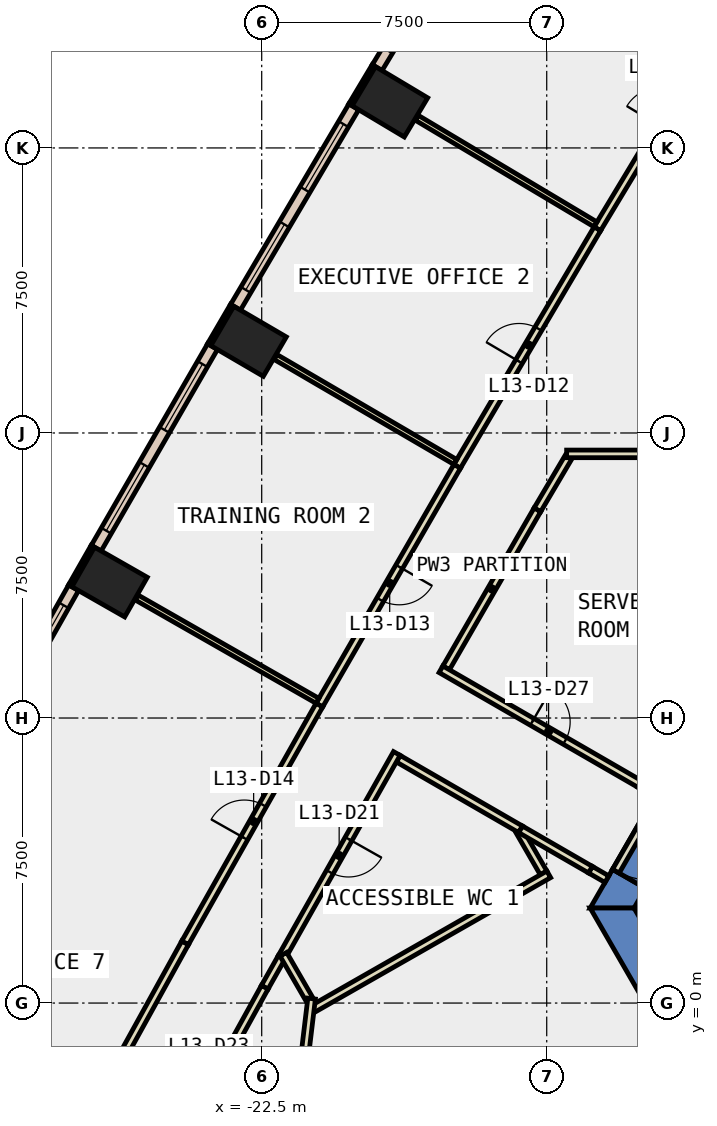
"""IFC4 building model, lengths in metres.
Left out: names, types, materials, properties, quantities, classifications, styles, units other than length and angle.
Written with IfcOpenShell. Run it as: python <this file> out.ifc"""

import sys

from ifc_helpers import new_model, si_unit, direction, frame, frame_2d, origin, origin_2d, place, context, subcontext, project, spatial, polyline, rectangle, outline, extrude, element, fill, save


model = new_model("IFC4")
c1 = context("Model", 3, precision=1e-05, world=origin(), true_north=direction((0.0, 1.0)))
c2 = subcontext(c1, "Body", "Model", "MODEL_VIEW")
j1 = project(units=[si_unit("LENGTHUNIT", "METRE"), si_unit("PLANEANGLEUNIT", "RADIAN")], contexts=[c1])
p1 = place(None, origin())
s1 = spatial("IfcSite", under=j1, at=p1, CompositionType="ELEMENT")
p2 = place(p1, origin())
s2 = spatial("IfcBuilding", under=s1, at=p2, CompositionType="ELEMENT")
p3 = place(p2, frame((0.0, 0.0, 64.4)))
s3 = spatial("IfcBuildingStorey", under=s2, at=p3, CompositionType="ELEMENT", Elevation=64.4)
for number, where, z_axis, x_axis in (
    (1, (-19.127, 23.714, -0.4), (0.0, 0.0, 1.0), (0.513, 0.858, 0.0)),
    (2, (-22.846, 17.413, -0.4), (0.0, 0.0, 1.0), (0.504, 0.864, 0.0)),
    (3, (-26.503, 11.078, -0.4), (0.0, 0.0, 1.0), (0.496, 0.869, 0.0)),
):
    element("IfcColumn", number, at=place(p3, frame(where, z_axis=z_axis, x_axis=x_axis)), inside=s3, PredefinedType="COLUMN", context=c2, shape_type="SweptSolid", body=[
        extrude(rectangle(XDim=1.2, YDim=1.6, at=origin_2d()), origin(), (0.0, 0.0, 1.0), 4.2),
    ])
p4 = place(p3, frame((0.0, 0.0, -0.4)))
e4 = element("IfcWall", 4, at=p4, inside=s3, PredefinedType="SHEAR", context=c2, shape_type="SweptSolid", body=[
    extrude(outline(polyline([(-12.402, 3.02), (-13.267, 3.52), (-13.856, 2.5), (-12.702, 2.5), (-12.402, 3.02)])), origin(), (0.0, 0.0, 1.0), 4.2),
])
p5 = place(p3, frame((0.0, 0.0, 3.6)))
e5 = element("IfcWall", 5, at=p5, inside=s3, PredefinedType="SHEAR", context=c2, shape_type="SweptSolid", body=[
    extrude(outline(polyline([(-13.267, 3.52), (-12.402, 3.02), (-11.402, 4.752), (-12.267, 5.252), (-13.267, 3.52)])), origin(), (0.0, 0.0, 1.0), 0.2),
])
p6 = place(p3, frame((0.0, 0.0, -0.4)))
e6 = element("IfcWall", 6, at=p6, inside=s3, PredefinedType="SHEAR", context=c2, shape_type="SweptSolid", body=[
    extrude(outline(polyline([(-13.856, 2.5), (-6.928, -9.5), (-6.351, -8.5), (-12.702, 2.5), (-13.856, 2.5)])), origin(), (0.0, 0.0, 1.0), 4.2),
])
p7 = place(p3, frame((-19.549, 24.665, 0.0), z_axis=(0.0, 0.0, 1.0), x_axis=(-0.513238760752, -0.858245870635, 0.0)))
e7 = element("IfcWall", 7, at=p7, inside=s3, PredefinedType="STANDARD", context=c2, shape_type="SweptSolid", body=[
    extrude(rectangle(XDim=1.2, YDim=0.1, at=frame_2d((0.6, 0.0))), origin(), (0.0, 0.0, 1.0), 3.8),
])
p8 = place(p3, frame((-23.277, 18.36, 0.0), z_axis=(0.0, 0.0, 1.0), x_axis=(-0.504225229382, -0.863572184623, 0.0)))
e8 = element("IfcWall", 8, at=p8, inside=s3, PredefinedType="STANDARD", context=c2, shape_type="SweptSolid", body=[
    extrude(rectangle(XDim=1.2, YDim=0.1, at=frame_2d((0.6, 0.0))), origin(), (0.0, 0.0, 1.0), 3.8),
])
p9 = place(p3, frame((-26.944, 12.02, 0.0), z_axis=(0.0, 0.0, 1.0), x_axis=(-0.495854054996, -0.868405870629, 0.0)))
e9 = element("IfcWall", 9, at=p9, inside=s3, PredefinedType="STANDARD", context=c2, shape_type="SweptSolid", body=[
    extrude(rectangle(XDim=1.2, YDim=0.1, at=frame_2d((0.6, 0.0))), origin(), (0.0, 0.0, 1.0), 3.8),
])
p10 = place(p3, frame((-16.3, 29.859, 0.0), z_axis=(0.0, 0.0, 1.0), x_axis=(-0.516147563478, -0.856499674674, 0.0)))
e10 = element("IfcWall", 10, at=p10, inside=s3, PredefinedType="STANDARD", context=c2, shape_type="SweptSolid", body=[
    extrude(rectangle(XDim=6.126, YDim=0.3, at=frame_2d((3.063, 0.0))), origin(), (0.0, 0.0, 1.0), 3.8),
])
p11 = place(p10, frame((0.532, 0.0, 0.9)))
e11 = element("IfcOpeningElement", 11, at=p11, cuts=e10, PredefinedType="OPENING", context=c2, shape_type="SweptSolid", body=[
    extrude(rectangle(XDim=2.0, YDim=2.6, at=frame_2d((1.0, 1.3))), frame((0.0, 0.16, 0.0), z_axis=(0.0, -1.0, 0.0), x_axis=(1.0, 0.0, 0.0)), (0.0, 0.0, 1.0), 0.32),
])
p12 = place(p10, frame((3.595, 0.0, 0.9)))
e12 = element("IfcOpeningElement", 12, at=p12, cuts=e10, PredefinedType="OPENING", context=c2, shape_type="SweptSolid", body=[
    extrude(rectangle(XDim=2.0, YDim=2.6, at=frame_2d((1.0, 1.3))), frame((0.0, 0.16, 0.0), z_axis=(0.0, -1.0, 0.0), x_axis=(1.0, 0.0, 0.0)), (0.0, 0.0, 1.0), 0.32),
])
p13 = place(p3, frame((-20.076, 23.583, 0.0), z_axis=(0.0, 0.0, 1.0), x_axis=(-0.508163938648, -0.861260362177, 0.0)))
e13 = element("IfcWall", 13, at=p13, inside=s3, PredefinedType="STANDARD", context=c2, shape_type="SweptSolid", body=[
    extrude(rectangle(XDim=6.126, YDim=0.3, at=frame_2d((3.063, 0.0))), origin(), (0.0, 0.0, 1.0), 3.8),
])
p14 = place(p13, frame((0.531, 0.0, 0.9)))
e14 = element("IfcOpeningElement", 14, at=p14, cuts=e13, PredefinedType="OPENING", context=c2, shape_type="SweptSolid", body=[
    extrude(rectangle(XDim=2.0, YDim=2.6, at=frame_2d((1.0, 1.3))), frame((0.0, 0.16, 0.0), z_axis=(0.0, -1.0, 0.0), x_axis=(1.0, 0.0, 0.0)), (0.0, 0.0, 1.0), 0.32),
])
p15 = place(p13, frame((3.594, 0.0, 0.9)))
e15 = element("IfcOpeningElement", 15, at=p15, cuts=e13, PredefinedType="OPENING", context=c2, shape_type="SweptSolid", body=[
    extrude(rectangle(XDim=2.0, YDim=2.6, at=frame_2d((1.0, 1.3))), frame((0.0, 0.16, 0.0), z_axis=(0.0, -1.0, 0.0), x_axis=(1.0, 0.0, 0.0)), (0.0, 0.0, 1.0), 0.32),
])
p16 = place(p3, frame((-23.793, 17.273, 0.0), z_axis=(0.0, 0.0, 1.0), x_axis=(-0.499903021601, -0.86608138705, 0.0)))
e16 = element("IfcWall", 16, at=p16, inside=s3, PredefinedType="STANDARD", context=c2, shape_type="SweptSolid", body=[
    extrude(rectangle(XDim=6.125, YDim=0.3, at=frame_2d((3.062, 0.0))), origin(), (0.0, 0.0, 1.0), 3.8),
])
p17 = place(p16, frame((0.531, 0.0, 0.9)))
e17 = element("IfcOpeningElement", 17, at=p17, cuts=e16, PredefinedType="OPENING", context=c2, shape_type="SweptSolid", body=[
    extrude(rectangle(XDim=2.0, YDim=2.6, at=frame_2d((1.0, 1.3))), frame((0.0, 0.16, 0.0), z_axis=(0.0, -1.0, 0.0), x_axis=(1.0, 0.0, 0.0)), (0.0, 0.0, 1.0), 0.32),
])
p18 = place(p16, frame((3.594, 0.0, 0.9)))
e18 = element("IfcOpeningElement", 18, at=p18, cuts=e16, PredefinedType="OPENING", context=c2, shape_type="SweptSolid", body=[
    extrude(rectangle(XDim=2.0, YDim=2.6, at=frame_2d((1.0, 1.3))), frame((0.0, 0.16, 0.0), z_axis=(0.0, -1.0, 0.0), x_axis=(1.0, 0.0, 0.0)), (0.0, 0.0, 1.0), 0.32),
])
p19 = place(p3, frame((-27.449, 10.928, 0.0), z_axis=(0.0, 0.0, 1.0), x_axis=(-0.491887822214, -0.870658584267, 0.0)))
e19 = element("IfcWall", 19, at=p19, inside=s3, PredefinedType="STANDARD", context=c2, shape_type="SweptSolid", body=[
    extrude(rectangle(XDim=6.125, YDim=0.3, at=frame_2d((3.062, 0.0))), origin(), (0.0, 0.0, 1.0), 3.8),
])
p20 = place(p19, frame((0.531, 0.0, 0.9)))
e20 = element("IfcOpeningElement", 20, at=p20, cuts=e19, PredefinedType="OPENING", context=c2, shape_type="SweptSolid", body=[
    extrude(rectangle(XDim=2.0, YDim=2.6, at=frame_2d((1.0, 1.3))), frame((0.0, 0.16, 0.0), z_axis=(0.0, -1.0, 0.0), x_axis=(1.0, 0.0, 0.0)), (0.0, 0.0, 1.0), 0.32),
])
p21 = place(p19, frame((3.594, 0.0, 0.9)))
e21 = element("IfcOpeningElement", 21, at=p21, cuts=e19, PredefinedType="OPENING", context=c2, shape_type="SweptSolid", body=[
    extrude(rectangle(XDim=2.0, YDim=2.6, at=frame_2d((1.0, 1.3))), frame((0.0, 0.16, 0.0), z_axis=(0.0, -1.0, 0.0), x_axis=(1.0, 0.0, 0.0)), (0.0, 0.0, 1.0), 0.32),
])
p22 = place(p3, frame((-14.427, 14.364, 0.0), z_axis=(0.0, 0.0, 1.0), x_axis=(-0.508509719672, -0.861056249614, 0.0)))
e22 = element("IfcWall", 22, at=p22, inside=s3, PredefinedType="PARTITIONING", context=c2, shape_type="SweptSolid", body=[
    extrude(rectangle(XDim=1.611, YDim=0.2, at=frame_2d((0.805, 0.0))), origin(), (0.0, 0.0, 1.0), 3.8),
])
p23 = place(p3, frame((-15.246, 12.977, 0.0), z_axis=(0.0, 0.0, 1.0), x_axis=(-0.499891203561, -0.866088208327, 0.0)))
e23 = element("IfcWall", 23, at=p23, inside=s3, PredefinedType="PARTITIONING", context=c2, shape_type="SweptSolid", body=[
    extrude(rectangle(XDim=4.801, YDim=0.2, at=frame_2d((2.4, 0.0))), origin(), (0.0, 0.0, 1.0), 3.8),
])
p24 = place(p3, frame((-17.783, 8.783, 0.0), z_axis=(0.0, 0.0, 1.0), x_axis=(0.866041598752, -0.499971948444, 0.0)))
e24 = element("IfcWall", 24, at=p24, inside=s3, PredefinedType="PARTITIONING", context=c2, shape_type="SweptSolid", body=[
    extrude(rectangle(XDim=6.042, YDim=0.2, at=frame_2d((3.021, 0.0))), origin(), (0.0, 0.0, 1.0), 3.8),
])
p25 = place(p24, frame((2.771, 0.0, 0.0)))
e25 = element("IfcOpeningElement", 25, at=p25, cuts=e24, PredefinedType="OPENING", context=c2, shape_type="SweptSolid", body=[
    extrude(rectangle(XDim=1.0, YDim=2.1, at=frame_2d((0.5, 1.05))), frame((0.0, 0.11, 0.0), z_axis=(0.0, -1.0, 0.0), x_axis=(1.0, 0.0, 0.0)), (0.0, 0.0, 1.0), 0.22),
])
p26 = place(p3, frame((-15.687, 4.571, 0.0), z_axis=(0.0, 0.0, 1.0), x_axis=(-0.866044530317, 0.49996687041, 0.0)))
e26 = element("IfcWall", 26, at=p26, inside=s3, PredefinedType="PARTITIONING", context=c2, shape_type="SweptSolid", body=[
    extrude(rectangle(XDim=3.718, YDim=0.2, at=frame_2d((1.859, 0.0))), origin(), (0.0, 0.0, 1.0), 3.8),
])
p27 = place(p3, frame((-18.945, 6.567, 0.0), z_axis=(0.0, 0.0, 1.0), x_axis=(-0.491840751019, -0.87068517596, 0.0)))
e27 = element("IfcWall", 27, at=p27, inside=s3, PredefinedType="PARTITIONING", context=c2, shape_type="SweptSolid", body=[
    extrude(rectangle(XDim=6.168, YDim=0.2, at=frame_2d((3.084, 0.0))), origin(), (0.0, 0.0, 1.0), 3.8),
])
p28 = place(p27, frame((2.584, 0.0, 0.0)))
e28 = element("IfcOpeningElement", 28, at=p28, cuts=e27, PredefinedType="OPENING", context=c2, shape_type="SweptSolid", body=[
    extrude(rectangle(XDim=1.0, YDim=2.1, at=frame_2d((0.5, 1.05))), frame((0.0, 0.11, 0.0), z_axis=(0.0, -1.0, 0.0), x_axis=(1.0, 0.0, 0.0)), (0.0, 0.0, 1.0), 0.22),
])
p29 = place(p3, frame((-13.417, 3.26, 0.0), z_axis=(0.0, 0.0, 1.0), x_axis=(-0.866071776036, 0.499919672301, 0.0)))
e29 = element("IfcWall", 29, at=p29, inside=s3, PredefinedType="PARTITIONING", context=c2, shape_type="SweptSolid", body=[
    extrude(rectangle(XDim=0.5, YDim=0.2, at=frame_2d((0.25, 0.0))), origin(), (0.0, 0.0, 1.0), 2.4),
])
p30 = place(p3, frame((-21.979, 1.196, 0.0), z_axis=(0.0, 0.0, 1.0), x_axis=(-0.491617674369, -0.870811151886, 0.0)))
e30 = element("IfcWall", 30, at=p30, inside=s3, PredefinedType="PARTITIONING", context=c2, shape_type="SweptSolid", body=[
    extrude(rectangle(XDim=0.897, YDim=0.2, at=frame_2d((0.448, 0.0))), origin(), (0.0, 0.0, 1.0), 3.8),
])
p31 = place(p3, frame((-22.42, 0.415, 0.0), z_axis=(0.0, 0.0, 1.0), x_axis=(-0.483559496818, -0.875311494861, 0.0)))
e31 = element("IfcWall", 31, at=p31, inside=s3, PredefinedType="PARTITIONING", context=c2, shape_type="SweptSolid", body=[
    extrude(rectangle(XDim=6.103, YDim=0.2, at=frame_2d((3.052, 0.0))), origin(), (0.0, 0.0, 1.0), 3.8),
])
p32 = place(p31, frame((2.552, 0.0, 0.0)))
e32 = element("IfcOpeningElement", 32, at=p32, cuts=e31, PredefinedType="OPENING", context=c2, shape_type="SweptSolid", body=[
    extrude(rectangle(XDim=1.0, YDim=2.1, at=frame_2d((0.5, 1.05))), frame((0.0, 0.11, 0.0), z_axis=(0.0, -1.0, 0.0), x_axis=(1.0, 0.0, 0.0)), (0.0, 0.0, 1.0), 0.22),
])
p33 = place(p3, frame((-13.669, 20.373, 0.0), z_axis=(0.0, 0.0, 1.0), x_axis=(0.516247820136, 0.85643924957, 0.0)))
e33 = element("IfcWall", 33, at=p33, inside=s3, PredefinedType="PARTITIONING", context=c2, shape_type="SweptSolid", body=[
    extrude(rectangle(XDim=7.332, YDim=0.2, at=frame_2d((3.666, 0.0))), origin(), (0.0, 0.0, 1.0), 3.8),
])
p34 = place(p33, frame((3.166, 0.0, 0.0)))
e34 = element("IfcOpeningElement", 34, at=p34, cuts=e33, PredefinedType="OPENING", context=c2, shape_type="SweptSolid", body=[
    extrude(rectangle(XDim=1.0, YDim=2.1, at=frame_2d((0.5, 1.05))), frame((0.0, 0.11, 0.0), z_axis=(0.0, -1.0, 0.0), x_axis=(1.0, 0.0, 0.0)), (0.0, 0.0, 1.0), 0.22),
])
p35 = place(p3, frame((-17.357, 14.122, 0.0), z_axis=(0.0, 0.0, 1.0), x_axis=(0.508298575594, 0.861180909014, 0.0)))
e35 = element("IfcWall", 35, at=p35, inside=s3, PredefinedType="PARTITIONING", context=c2, shape_type="SweptSolid", body=[
    extrude(rectangle(XDim=7.258, YDim=0.2, at=frame_2d((3.629, 0.0))), origin(), (0.0, 0.0, 1.0), 3.8),
])
p36 = place(p35, frame((3.204, 0.0, 0.0)))
e36 = element("IfcOpeningElement", 36, at=p36, cuts=e35, PredefinedType="OPENING", context=c2, shape_type="SweptSolid", body=[
    extrude(rectangle(XDim=1.0, YDim=2.1, at=frame_2d((0.5, 1.05))), frame((0.0, 0.11, 0.0), z_axis=(0.0, -1.0, 0.0), x_axis=(1.0, 0.0, 0.0)), (0.0, 0.0, 1.0), 0.22),
])
p37 = place(p3, frame((-17.356, 14.122, 0.0), z_axis=(0.0, 0.0, 1.0), x_axis=(-0.499946764175, -0.866056137321, 0.0)))
e37 = element("IfcWall", 37, at=p37, inside=s3, PredefinedType="PARTITIONING", context=c2, shape_type="SweptSolid", body=[
    extrude(rectangle(XDim=7.255, YDim=0.2, at=frame_2d((3.627, 0.0))), origin(), (0.0, 0.0, 1.0), 3.8),
])
p38 = place(p37, frame((3.052, 0.0, 0.0)))
e38 = element("IfcOpeningElement", 38, at=p38, cuts=e37, PredefinedType="OPENING", context=c2, shape_type="SweptSolid", body=[
    extrude(rectangle(XDim=1.0, YDim=2.1, at=frame_2d((0.5, 1.05))), frame((0.0, 0.11, 0.0), z_axis=(0.0, -1.0, 0.0), x_axis=(1.0, 0.0, 0.0)), (0.0, 0.0, 1.0), 0.22),
])
p39 = place(p3, frame((-28.06, -4.831, 0.0), z_axis=(0.0, 0.0, 1.0), x_axis=(0.483631054848, 0.875271959328, 0.0)))
e39 = element("IfcWall", 39, at=p39, inside=s3, PredefinedType="PARTITIONING", context=c2, shape_type="SweptSolid", body=[
    extrude(rectangle(XDim=7.33, YDim=0.2, at=frame_2d((3.665, 0.0))), origin(), (0.0, 0.0, 1.0), 3.8),
])
p40 = place(p3, frame((-24.515, 1.585, 0.0), z_axis=(0.0, 0.0, 1.0), x_axis=(0.49174361417, 0.870740040381, 0.0)))
e40 = element("IfcWall", 40, at=p40, inside=s3, PredefinedType="PARTITIONING", context=c2, shape_type="SweptSolid", body=[
    extrude(rectangle(XDim=7.183, YDim=0.2, at=frame_2d((3.591, 0.0))), origin(), (0.0, 0.0, 1.0), 3.8),
])
p41 = place(p40, frame((3.166, 0.0, 0.0)))
e41 = element("IfcOpeningElement", 41, at=p41, cuts=e40, PredefinedType="OPENING", context=c2, shape_type="SweptSolid", body=[
    extrude(rectangle(XDim=1.0, YDim=2.1, at=frame_2d((0.5, 1.05))), frame((0.0, 0.11, 0.0), z_axis=(0.0, -1.0, 0.0), x_axis=(1.0, 0.0, 0.0)), (0.0, 0.0, 1.0), 0.22),
])
p42 = place(p3, frame((-6.957, 14.45, 0.0), z_axis=(0.0, 0.0, 1.0), x_axis=(-1.0, 0.0, 0.0)))
e42 = element("IfcWall", 42, at=p42, inside=s3, PredefinedType="PARTITIONING", context=c2, shape_type="SweptSolid", body=[
    extrude(rectangle(XDim=7.519, YDim=0.2, at=frame_2d((3.76, 0.0))), origin(), (0.0, 0.0, 1.0), 3.8),
])
p43 = place(p3, frame((-15.724, 4.534, 0.0), z_axis=(0.0, 0.0, 1.0), x_axis=(0.500195085719, -0.865912741691, 0.0)))
e43 = element("IfcWall", 43, at=p43, inside=s3, PredefinedType="PARTITIONING", context=c2, shape_type="SweptSolid", body=[
    extrude(rectangle(XDim=1.282, YDim=0.2, at=frame_2d((0.641, 0.0))), origin(), (0.0, 0.0, 1.0), 3.8),
])
p44 = place(p3, frame((-14.946, 3.387, 0.0), z_axis=(0.0, 0.0, 1.0), x_axis=(-0.868556003823, -0.4955910292, 0.0)))
e44 = element("IfcWall", 44, at=p44, inside=s3, PredefinedType="PARTITIONING", context=c2, shape_type="SweptSolid", body=[
    extrude(rectangle(XDim=7.199, YDim=0.2, at=frame_2d((3.6, 0.0))), origin(), (0.0, 0.0, 1.0), 3.8),
])
p45 = place(p3, frame((-21.249, 0.105, 0.0), z_axis=(0.0, 0.0, 1.0), x_axis=(-0.500442009317, 0.865770059144, 0.0)))
e45 = element("IfcWall", 45, at=p45, inside=s3, PredefinedType="PARTITIONING", context=c2, shape_type="SweptSolid", body=[
    extrude(rectangle(XDim=1.361, YDim=0.2, at=frame_2d((0.68, 0.0))), origin(), (0.0, 0.0, 1.0), 3.8),
])
p46 = place(p3, frame((-22.403, -10.017, 0.0), z_axis=(0.0, 0.0, 1.0), x_axis=(0.119143334217, 0.992877064853, 0.0)))
e46 = element("IfcWall", 46, at=p46, inside=s3, PredefinedType="PARTITIONING", context=c2, shape_type="SweptSolid", body=[
    extrude(rectangle(XDim=10.207, YDim=0.2, at=frame_2d((5.104, 0.0))), origin(), (0.0, 0.0, 1.0), 3.8),
])
p47 = place(p3, frame((-13.716, 20.488, 0.0), z_axis=(0.0, 0.0, 1.0), x_axis=(-0.85883841868, 0.512246591594, 0.0)))
e47 = element("IfcWall", 47, at=p47, inside=s3, PredefinedType="PARTITIONING", context=c2, shape_type="SweptSolid", body=[
    extrude(rectangle(XDim=5.479, YDim=0.15, at=frame_2d((2.74, 0.0))), origin(), (0.0, 0.0, 1.0), 3.8),
])
p48 = place(p3, frame((-17.405, 14.237, 0.0), z_axis=(0.0, 0.0, 1.0), x_axis=(-0.863614048932, 0.504153522736, 0.0)))
e48 = element("IfcWall", 48, at=p48, inside=s3, PredefinedType="PARTITIONING", context=c2, shape_type="SweptSolid", body=[
    extrude(rectangle(XDim=5.48, YDim=0.15, at=frame_2d((2.74, 0.0))), origin(), (0.0, 0.0, 1.0), 3.8),
])
p49 = place(p3, frame((-21.033, 7.953, 0.0), z_axis=(0.0, 0.0, 1.0), x_axis=(-0.868311678357, 0.496018980715, 0.0)))
e49 = element("IfcWall", 49, at=p49, inside=s3, PredefinedType="PARTITIONING", context=c2, shape_type="SweptSolid", body=[
    extrude(rectangle(XDim=5.48, YDim=0.15, at=frame_2d((2.74, 0.0))), origin(), (0.0, 0.0, 1.0), 3.8),
])
p50 = place(p3, frame((-12.18, 5.202, 0.0), z_axis=(0.0, 0.0, 1.0), x_axis=(-0.50002537861, -0.866010750942, 0.0)))
e50 = element("IfcWall", 50, at=p50, inside=s3, PredefinedType="PARTITIONING", context=c2, shape_type="SweptSolid", body=[
    extrude(rectangle(XDim=2.0, YDim=0.2, at=frame_2d((1.0, 0.0))), origin(), (0.0, 0.0, 1.0), 2.4),
])
p51 = place(p50, frame((0.19, 0.0, 0.0)))
e51 = element("IfcOpeningElement", 51, at=p51, cuts=e50, PredefinedType="OPENING", context=c2, shape_type="SweptSolid", body=[
    extrude(rectangle(XDim=1.8, YDim=2.1, at=frame_2d((0.9, 1.05))), frame((0.0, 0.11, 0.0), z_axis=(0.0, -1.0, 0.0), x_axis=(1.0, 0.0, 0.0)), (0.0, 0.0, 1.0), 0.22),
])
p52 = place(p3, frame((-13.85, 3.51, 0.0), z_axis=(0.0, 0.0, 1.0), x_axis=(-0.865924890849, 0.500174053114, 0.0)))
e52 = element("IfcWall", 52, at=p52, inside=s3, PredefinedType="PARTITIONING", context=c2, shape_type="SweptSolid", body=[
    extrude(rectangle(XDim=2.121, YDim=0.2, at=frame_2d((1.061, 0.0))), origin(), (0.0, 0.0, 1.0), 3.8),
])
p53 = place(p14, origin())
e53 = element("IfcWindow", 53, at=p53, inside=s3, PartitioningType="SINGLE_PANEL", PredefinedType="WINDOW", context=c2, shape_type="SweptSolid", body=[
    extrude(rectangle(XDim=2.0, YDim=2.6, at=frame_2d((1.0, 1.3))), frame((0.0, 0.03, 0.0), z_axis=(0.0, -1.0, 0.0), x_axis=(1.0, 0.0, 0.0)), (0.0, 0.0, 1.0), 0.06),
])
fill(e14, e53)
p54 = place(p15, origin())
e54 = element("IfcWindow", 54, at=p54, inside=s3, PartitioningType="SINGLE_PANEL", PredefinedType="WINDOW", context=c2, shape_type="SweptSolid", body=[
    extrude(rectangle(XDim=2.0, YDim=2.6, at=frame_2d((1.0, 1.3))), frame((0.0, 0.03, 0.0), z_axis=(0.0, -1.0, 0.0), x_axis=(1.0, 0.0, 0.0)), (0.0, 0.0, 1.0), 0.06),
])
fill(e15, e54)
p55 = place(p17, origin())
e55 = element("IfcWindow", 55, at=p55, inside=s3, PartitioningType="SINGLE_PANEL", PredefinedType="WINDOW", context=c2, shape_type="SweptSolid", body=[
    extrude(rectangle(XDim=2.0, YDim=2.6, at=frame_2d((1.0, 1.3))), frame((0.0, 0.03, 0.0), z_axis=(0.0, -1.0, 0.0), x_axis=(1.0, 0.0, 0.0)), (0.0, 0.0, 1.0), 0.06),
])
fill(e17, e55)
p56 = place(p18, origin())
e56 = element("IfcWindow", 56, at=p56, inside=s3, PartitioningType="SINGLE_PANEL", PredefinedType="WINDOW", context=c2, shape_type="SweptSolid", body=[
    extrude(rectangle(XDim=2.0, YDim=2.6, at=frame_2d((1.0, 1.3))), frame((0.0, 0.03, 0.0), z_axis=(0.0, -1.0, 0.0), x_axis=(1.0, 0.0, 0.0)), (0.0, 0.0, 1.0), 0.06),
])
fill(e18, e56)
p57 = place(p20, origin())
e57 = element("IfcWindow", 57, at=p57, inside=s3, PartitioningType="SINGLE_PANEL", PredefinedType="WINDOW", context=c2, shape_type="SweptSolid", body=[
    extrude(rectangle(XDim=2.0, YDim=2.6, at=frame_2d((1.0, 1.3))), frame((0.0, 0.03, 0.0), z_axis=(0.0, -1.0, 0.0), x_axis=(1.0, 0.0, 0.0)), (0.0, 0.0, 1.0), 0.06),
])
fill(e20, e57)
p58 = place(p36, origin())
e58 = element("IfcDoor", 58, at=p58, inside=s3, OperationType="SINGLE_SWING_RIGHT", PredefinedType="DOOR", context=c2, shape_type="SweptSolid", body=[
    extrude(rectangle(XDim=1.0, YDim=2.1, at=frame_2d((0.5, 1.05))), frame((0.0, 0.025, 0.0), z_axis=(0.0, -1.0, 0.0), x_axis=(1.0, 0.0, 0.0)), (0.0, 0.0, 1.0), 0.05),
])
fill(e36, e58)
p59 = place(p38, origin())
e59 = element("IfcDoor", 59, at=p59, inside=s3, OperationType="SINGLE_SWING_RIGHT", PredefinedType="DOOR", context=c2, shape_type="SweptSolid", body=[
    extrude(rectangle(XDim=1.0, YDim=2.1, at=frame_2d((0.5, 1.05))), frame((0.0, 0.025, 0.0), z_axis=(0.0, -1.0, 0.0), x_axis=(1.0, 0.0, 0.0)), (0.0, 0.0, 1.0), 0.05),
])
fill(e38, e59)
p60 = place(p41, origin())
e60 = element("IfcDoor", 60, at=p60, inside=s3, OperationType="SINGLE_SWING_RIGHT", PredefinedType="DOOR", context=c2, shape_type="SweptSolid", body=[
    extrude(rectangle(XDim=1.0, YDim=2.1, at=frame_2d((0.5, 1.05))), frame((0.0, 0.025, 0.0), z_axis=(0.0, -1.0, 0.0), x_axis=(1.0, 0.0, 0.0)), (0.0, 0.0, 1.0), 0.05),
])
fill(e41, e60)
p61 = place(p28, origin())
e61 = element("IfcDoor", 61, at=p61, inside=s3, OperationType="SINGLE_SWING_LEFT", PredefinedType="DOOR", context=c2, shape_type="SweptSolid", body=[
    extrude(rectangle(XDim=1.0, YDim=2.1, at=frame_2d((0.5, 1.05))), frame((0.0, 0.025, 0.0), z_axis=(0.0, -1.0, 0.0), x_axis=(1.0, 0.0, 0.0)), (0.0, 0.0, 1.0), 0.05),
])
fill(e28, e61)
p62 = place(p25, origin())
e62 = element("IfcDoor", 62, at=p62, inside=s3, OperationType="SINGLE_SWING_LEFT", PredefinedType="DOOR", context=c2, shape_type="SweptSolid", body=[
    extrude(rectangle(XDim=1.0, YDim=2.1, at=frame_2d((0.5, 1.05))), frame((0.0, 0.025, 0.0), z_axis=(0.0, -1.0, 0.0), x_axis=(1.0, 0.0, 0.0)), (0.0, 0.0, 1.0), 0.05),
])
fill(e25, e62)
p63 = place(p51, origin())
e63 = element("IfcDoor", 63, at=p63, inside=s3, OperationType="DOUBLE_DOOR_SINGLE_SWING", PredefinedType="DOOR", context=c2, shape_type="SweptSolid", body=[
    extrude(rectangle(XDim=1.8, YDim=2.1, at=frame_2d((0.9, 1.05))), frame((0.0, 0.025, 0.0), z_axis=(0.0, -1.0, 0.0), x_axis=(1.0, 0.0, 0.0)), (0.0, 0.0, 1.0), 0.05),
])
fill(e51, e63)
save(model, sys.argv[1])
